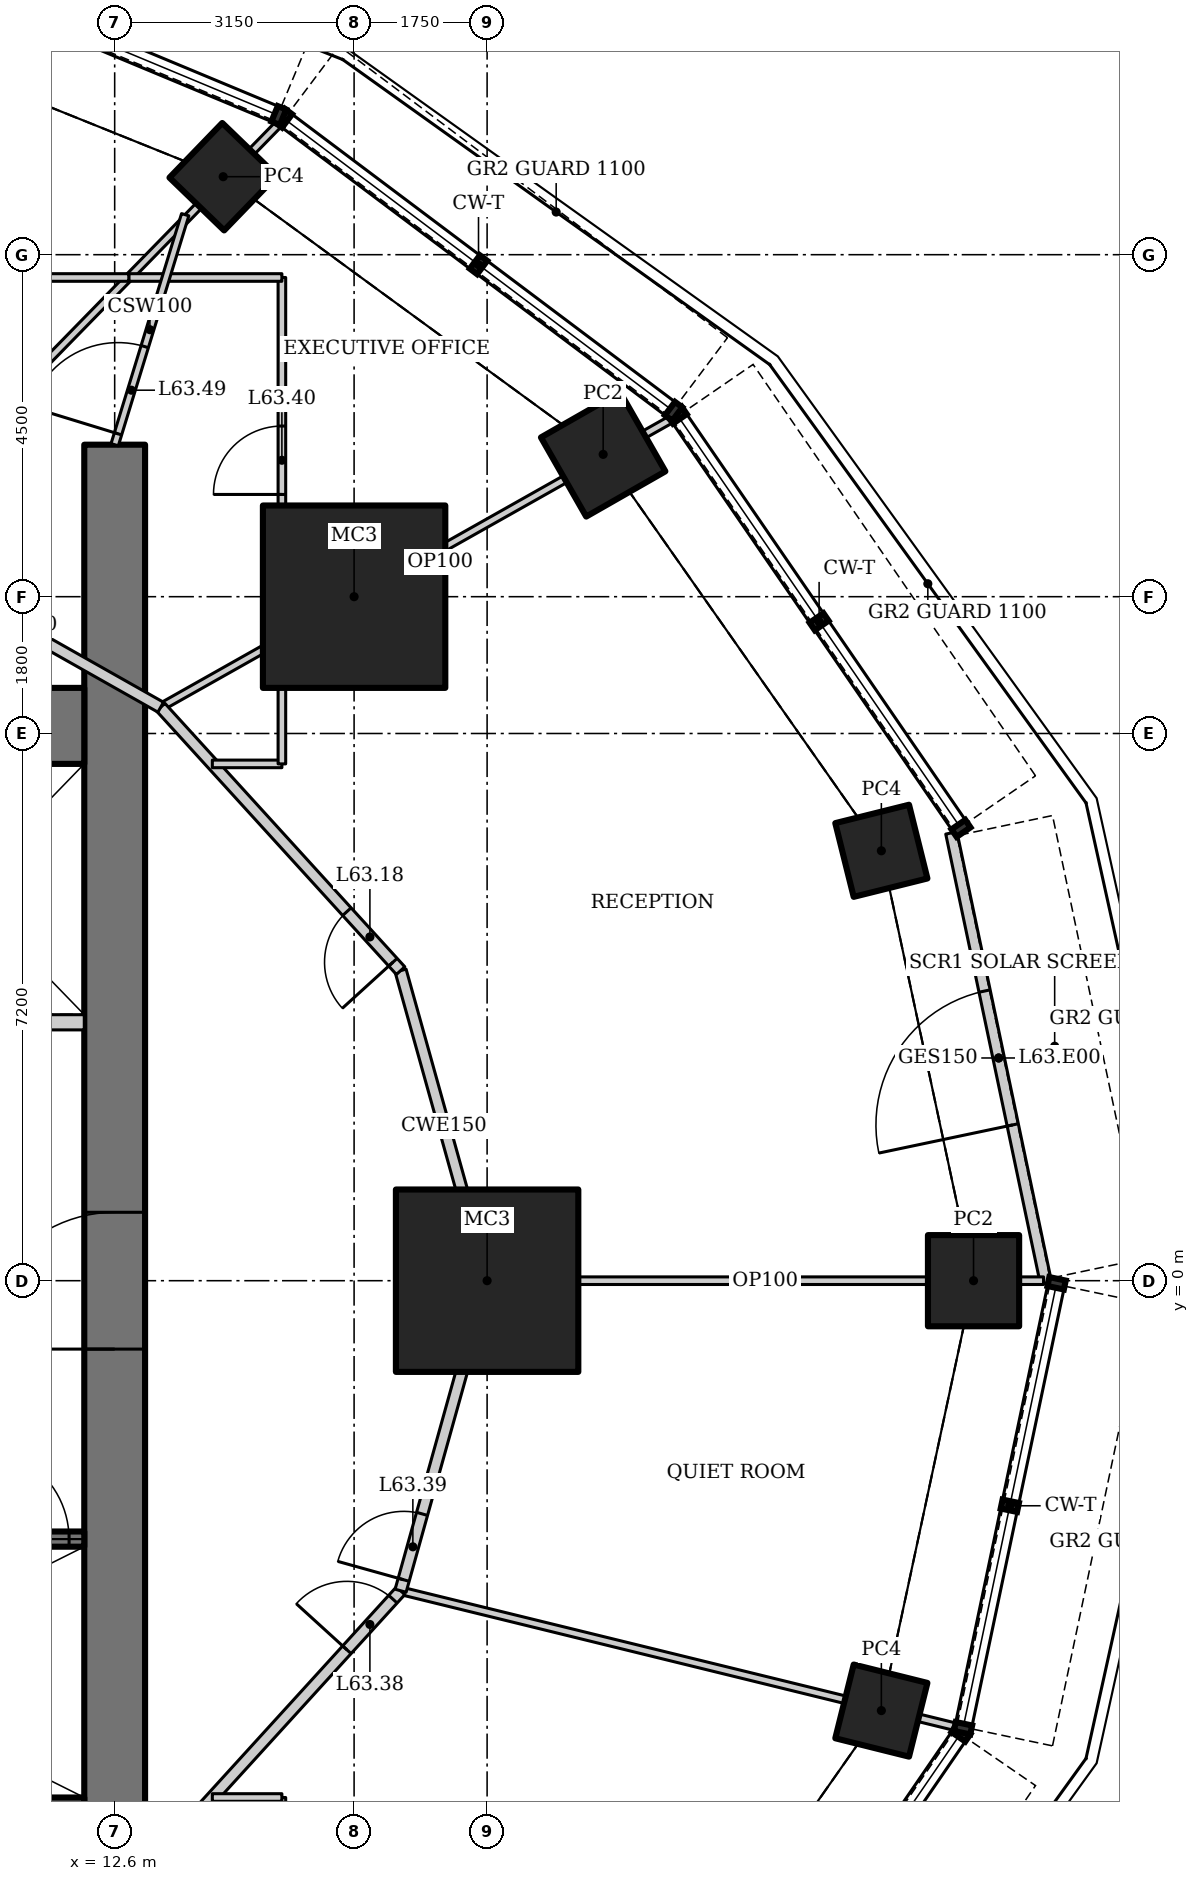
"""IFC4 building model, lengths in metres.
Left out: names, types, materials, properties, quantities, classifications, styles, units other than length and angle.
Written with IfcOpenShell. Run it as: python <this file> out.ifc"""

import sys

from ifc_helpers import new_model, si_unit, direction, frame, frame_2d, origin, origin_2d, place, context, subcontext, project, spatial, rectangle, hollow_rectangle, extrude, element, fill, save


model = new_model("IFC4")
c1 = context("Model", 3, precision=1e-05, world=origin(), true_north=direction((0.0, 1.0)))
c2 = subcontext(c1, "Body", "Model", "MODEL_VIEW")
j1 = project(units=[si_unit("LENGTHUNIT", "METRE"), si_unit("PLANEANGLEUNIT", "RADIAN")], contexts=[c1])
p1 = place(None, origin())
s1 = spatial("IfcSite", under=j1, at=p1, CompositionType="ELEMENT")
p2 = place(p1, origin())
s2 = spatial("IfcBuilding", under=s1, at=p2, CompositionType="ELEMENT")
p3 = place(p2, frame((0.0, 0.0, 270.4)))
s3 = spatial("IfcBuildingStorey", under=s2, at=p3, CompositionType="ELEMENT", Elevation=270.4)
for number, where, z_axis, x_axis in (
    (1, (17.5, 0.0, 0.0), (0.0, 0.0, 1.0), (1.0, 0.0, 0.0)),
    (2, (15.75, 9.0, 0.0), (0.0, 0.0, 1.0), (1.0, 0.0, 0.0)),
):
    element("IfcColumn", number, at=place(p3, frame(where, z_axis=z_axis, x_axis=x_axis)), inside=s3, PredefinedType="COLUMN", context=c2, shape_type="SweptSolid", body=[
        extrude(hollow_rectangle(XDim=2.4, YDim=2.4, WallThickness=0.12, at=origin_2d()), origin(), (0.0, 0.0, 1.0), 4.5),
    ])
p4 = place(p3, frame((23.9, 0.0, 1.059), z_axis=(0.0, 0.0, 1.0), x_axis=(1.0, 0.0, 0.0)))
e3 = element("IfcColumn", 3, at=p4, inside=s3, PredefinedType="COLUMN", context=c2, shape_type="SweptSolid", body=[
    extrude(hollow_rectangle(XDim=1.2, YDim=1.2, WallThickness=0.1, at=origin_2d()), origin(), (0.0, 0.0, 1.0), 3.441),
])
p5 = place(p3, frame((22.687, 5.656, 0.892), z_axis=(0.0, 0.0, 1.0), x_axis=(0.970295726276, 0.2419218956, 0.0)))
e4 = element("IfcColumn", 4, at=p5, inside=s3, PredefinedType="COLUMN", context=c2, shape_type="SweptSolid", body=[
    extrude(hollow_rectangle(XDim=1.0, YDim=1.0, WallThickness=0.08, at=origin_2d()), origin(), (0.0, 0.0, 1.0), 3.608),
])
p6 = place(p3, frame((19.027, 10.873, 1.103), z_axis=(0.0, 0.0, 1.0), x_axis=(0.86824298017, 0.496139221777, 0.0)))
e5 = element("IfcColumn", 5, at=p6, inside=s3, PredefinedType="COLUMN", context=c2, shape_type="SweptSolid", body=[
    extrude(hollow_rectangle(XDim=1.2, YDim=1.2, WallThickness=0.1, at=origin_2d()), origin(), (0.0, 0.0, 1.0), 3.397),
])
p7 = place(p3, frame((14.028, 14.526, 0.947), z_axis=(0.0, 0.0, 1.0), x_axis=(0.694658370459, 0.719339800339, 0.0)))
e6 = element("IfcColumn", 6, at=p7, inside=s3, PredefinedType="COLUMN", context=c2, shape_type="SweptSolid", body=[
    extrude(hollow_rectangle(XDim=1.0, YDim=1.0, WallThickness=0.08, at=origin_2d()), origin(), (0.0, 0.0, 1.0), 3.553),
])
p8 = place(p3, frame((22.687, -5.656, 0.892), z_axis=(0.0, 0.0, 1.0), x_axis=(0.2419218956, 0.970295726276, 0.0)))
e7 = element("IfcColumn", 7, at=p8, inside=s3, PredefinedType="COLUMN", context=c2, shape_type="SweptSolid", body=[
    extrude(hollow_rectangle(XDim=1.0, YDim=1.0, WallThickness=0.08, at=origin_2d()), origin(), (0.0, 0.0, 1.0), 3.608),
])
p9 = place(p3, frame((12.6, -11.0, 0.0), z_axis=(0.0, 0.0, 1.0), x_axis=(0.0, 1.0, 0.0)))
e8 = element("IfcWall", 8, at=p9, inside=s3, PredefinedType="SHEAR", context=c2, shape_type="SweptSolid", body=[
    extrude(rectangle(XDim=22.0, YDim=0.8, at=frame_2d((11.0, 0.0))), origin(), (0.0, 0.0, 1.0), 4.5),
])
p10 = place(p9, frame((10.1, 0.0, 0.0)))
e9 = element("IfcOpeningElement", 9, at=p10, cuts=e8, PredefinedType="OPENING", context=c2, shape_type="SweptSolid", body=[
    extrude(rectangle(XDim=1.8, YDim=2.1, at=frame_2d((0.9, 1.05))), frame((0.0, 0.41, 0.0), z_axis=(0.0, -1.0, 0.0), x_axis=(1.0, 0.0, 0.0)), (0.0, 0.0, 1.0), 0.82),
])
p11 = place(p3, frame((-12.2, -7.3, 0.0), z_axis=(0.0, 0.0, 1.0), x_axis=(1.0, 0.0, 0.0)))
e10 = element("IfcWall", 10, at=p11, inside=s3, PredefinedType="SHEAR", context=c2, shape_type="SweptSolid", body=[
    extrude(rectangle(XDim=24.4, YDim=1.0, at=frame_2d((12.2, 0.0))), origin(), (0.0, 0.0, 1.0), 4.5),
])
p12 = place(p3, frame((12.2, 7.3, 0.0), z_axis=(0.0, 0.0, 1.0), x_axis=(-1.0, 0.0, 0.0)))
e11 = element("IfcWall", 11, at=p12, inside=s3, PredefinedType="SHEAR", context=c2, shape_type="SweptSolid", body=[
    extrude(rectangle(XDim=6.6, YDim=1.0, at=frame_2d((3.3, 0.0))), origin(), (0.0, 0.0, 1.0), 4.5),
])
p13 = place(p3, frame((5.6, -3.4, 0.0), z_axis=(0.0, 0.0, 1.0), x_axis=(1.0, 0.0, 0.0)))
e12 = element("IfcWall", 12, at=p13, inside=s3, PredefinedType="SHEAR", context=c2, shape_type="SweptSolid", body=[
    extrude(rectangle(XDim=6.6, YDim=0.2, at=frame_2d((3.3, 0.0))), origin(), (0.0, 0.0, 1.0), 4.5),
])
p14 = place(p13, frame((5.2, 0.0, 0.0)))
e13 = element("IfcOpeningElement", 13, at=p14, cuts=e12, PredefinedType="OPENING", context=c2, shape_type="SweptSolid", body=[
    extrude(rectangle(XDim=1.2, YDim=2.1, at=frame_2d((0.6, 1.05))), frame((0.0, 0.11, 0.0), z_axis=(0.0, -1.0, 0.0), x_axis=(1.0, 0.0, 0.0)), (0.0, 0.0, 1.0), 0.22),
])
p15 = place(p3, frame((12.2, 3.4, 0.0), z_axis=(0.0, 0.0, 1.0), x_axis=(-1.0, 0.0, 0.0)))
e14 = element("IfcWall", 14, at=p15, inside=s3, PredefinedType="SOLIDWALL", context=c2, shape_type="SweptSolid", body=[
    extrude(rectangle(XDim=6.6, YDim=0.2, at=frame_2d((3.3, 0.0))), origin(), (0.0, 0.0, 1.0), 4.5),
])
p16 = place(p15, frame((4.45, 0.0, 0.0)))
e15 = element("IfcOpeningElement", 15, at=p16, cuts=e14, PredefinedType="OPENING", context=c2, shape_type="SweptSolid", body=[
    extrude(rectangle(XDim=1.1, YDim=2.2, at=frame_2d((0.55, 1.1))), frame((0.0, 0.11, 0.0), z_axis=(0.0, -1.0, 0.0), x_axis=(1.0, 0.0, 0.0)), (0.0, 0.0, 1.0), 0.22),
])
p17 = place(p15, frame((0.9, 0.0, 0.0)))
e16 = element("IfcOpeningElement", 16, at=p17, cuts=e14, PredefinedType="OPENING", context=c2, shape_type="SweptSolid", body=[
    extrude(rectangle(XDim=1.4, YDim=2.2, at=frame_2d((0.7, 1.1))), frame((0.0, 0.11, 0.0), z_axis=(0.0, -1.0, 0.0), x_axis=(1.0, 0.0, 0.0)), (0.0, 0.0, 1.0), 0.22),
])
p18 = place(p3, frame((24.853, -0.031, 0.0), z_axis=(0.0, 0.0, 1.0), x_axis=(-0.20581124117, 0.978591709043, 0.0)))
e17 = element("IfcWall", 17, at=p18, inside=s3, PredefinedType="ELEMENTEDWALL", context=c2, shape_type="SweptSolid", body=[
    extrude(rectangle(XDim=6.052, YDim=0.15, at=frame_2d((3.026, 0.0))), origin(), (0.0, 0.0, 1.0), 4.35),
])
p19 = place(p18, frame((2.126, 0.0, 0.0)))
e18 = element("IfcOpeningElement", 18, at=p19, cuts=e17, PredefinedType="OPENING", context=c2, shape_type="SweptSolid", body=[
    extrude(rectangle(XDim=1.8, YDim=2.4, at=frame_2d((0.9, 1.2))), frame((0.0, 0.085, 0.0), z_axis=(0.0, -1.0, 0.0), x_axis=(1.0, 0.0, 0.0)), (0.0, 0.0, 1.0), 0.17),
])
p20 = place(p3, frame((24.821, 0.0, 0.0), z_axis=(0.0, 0.0, 1.0), x_axis=(-1.0, 0.0, 0.0)))
e19 = element("IfcWall", 19, at=p20, inside=s3, PredefinedType="PARTITIONING", context=c2, shape_type="SweptSolid", body=[
    extrude(rectangle(XDim=7.321, YDim=0.1, at=frame_2d((3.661, 0.0))), origin(), (0.0, 0.0, 1.0), 3.738),
])
p21 = place(p3, frame((19.959, 11.355, 0.0), z_axis=(0.0, 0.0, 1.0), x_axis=(-0.871035125561, -0.491220734537, 0.0)))
e20 = element("IfcWall", 20, at=p21, inside=s3, PredefinedType="PARTITIONING", context=c2, shape_type="SweptSolid", body=[
    extrude(rectangle(XDim=7.753, YDim=0.1, at=frame_2d((3.877, 0.0))), origin(), (0.0, 0.0, 1.0), 3.824),
])
p22 = place(p3, frame((14.789, 15.251, 0.0), z_axis=(0.0, 0.0, 1.0), x_axis=(-0.698752653188, -0.71536335499, 0.0)))
e21 = element("IfcWall", 21, at=p22, inside=s3, PredefinedType="PARTITIONING", context=c2, shape_type="SweptSolid", body=[
    extrude(rectangle(XDim=7.746, YDim=0.1, at=frame_2d((3.873, 0.0))), origin(), (0.0, 0.0, 1.0), 3.723),
])
p23 = place(p3, frame((23.707, -5.881, 0.0), z_axis=(0.0, 0.0, 1.0), x_axis=(-0.971215212425, 0.238203717759, 0.0)))
e22 = element("IfcWall", 22, at=p23, inside=s3, PredefinedType="PARTITIONING", context=c2, shape_type="SweptSolid", body=[
    extrude(rectangle(XDim=7.563, YDim=0.1, at=frame_2d((3.781, 0.0))), origin(), (0.0, 0.0, 1.0), 3.408),
])
p24 = place(p3, frame((17.5, 0.0, 0.0), z_axis=(0.0, 0.0, 1.0), x_axis=(-0.268731808547, 0.963215040931, 0.0)))
e23 = element("IfcWall", 23, at=p24, inside=s3, PredefinedType="PARTITIONING", context=c2, shape_type="SweptSolid", body=[
    extrude(rectangle(XDim=4.235, YDim=0.15, at=frame_2d((2.118, 0.0))), origin(), (0.0, 0.0, 1.0), 4.35),
])
p25 = place(p3, frame((16.362, 4.08, 0.0), z_axis=(0.0, 0.0, 1.0), x_axis=(-0.67323765707, 0.739426167445, 0.0)))
e24 = element("IfcWall", 24, at=p25, inside=s3, PredefinedType="PARTITIONING", context=c2, shape_type="SweptSolid", body=[
    extrude(rectangle(XDim=4.688, YDim=0.15, at=frame_2d((2.344, 0.0))), origin(), (0.0, 0.0, 1.0), 4.35),
])
p26 = place(p25, frame((0.15, 0.0, 0.0)))
e25 = element("IfcOpeningElement", 25, at=p26, cuts=e24, PredefinedType="OPENING", context=c2, shape_type="SweptSolid", body=[
    extrude(rectangle(XDim=0.9, YDim=2.1, at=frame_2d((0.45, 1.05))), frame((0.0, 0.085, 0.0), z_axis=(0.0, -1.0, 0.0), x_axis=(1.0, 0.0, 0.0)), (0.0, 0.0, 1.0), 0.17),
])
p27 = place(p3, frame((13.206, 7.546, 0.0), z_axis=(0.0, 0.0, 1.0), x_axis=(-0.870593853694, 0.492002379984, 0.0)))
e26 = element("IfcWall", 26, at=p27, inside=s3, PredefinedType="PARTITIONING", context=c2, shape_type="SweptSolid", body=[
    extrude(rectangle(XDim=4.398, YDim=0.15, at=frame_2d((2.199, 0.0))), origin(), (0.0, 0.0, 1.0), 4.35),
])
p28 = place(p27, frame((3.348, 0.0, 0.0)))
e27 = element("IfcOpeningElement", 27, at=p28, cuts=e26, PredefinedType="OPENING", context=c2, shape_type="SweptSolid", body=[
    extrude(rectangle(XDim=0.9, YDim=2.1, at=frame_2d((0.45, 1.05))), frame((0.0, 0.085, 0.0), z_axis=(0.0, -1.0, 0.0), x_axis=(1.0, 0.0, 0.0)), (0.0, 0.0, 1.0), 0.17),
])
p29 = place(p3, frame((13.206, -7.546, 0.0), z_axis=(0.0, 0.0, 1.0), x_axis=(0.67323765707, 0.739426167445, 0.0)))
e28 = element("IfcWall", 28, at=p29, inside=s3, PredefinedType="PARTITIONING", context=c2, shape_type="SweptSolid", body=[
    extrude(rectangle(XDim=4.688, YDim=0.15, at=frame_2d((2.344, 0.0))), origin(), (0.0, 0.0, 1.0), 4.35),
])
p30 = place(p29, frame((3.638, 0.0, 0.0)))
e29 = element("IfcOpeningElement", 29, at=p30, cuts=e28, PredefinedType="OPENING", context=c2, shape_type="SweptSolid", body=[
    extrude(rectangle(XDim=0.9, YDim=2.1, at=frame_2d((0.45, 1.05))), frame((0.0, 0.085, 0.0), z_axis=(0.0, -1.0, 0.0), x_axis=(1.0, 0.0, 0.0)), (0.0, 0.0, 1.0), 0.17),
])
p31 = place(p3, frame((16.362, -4.08, 0.0), z_axis=(0.0, 0.0, 1.0), x_axis=(0.268731808547, 0.963215040931, 0.0)))
e30 = element("IfcWall", 30, at=p31, inside=s3, PredefinedType="PARTITIONING", context=c2, shape_type="SweptSolid", body=[
    extrude(rectangle(XDim=4.235, YDim=0.15, at=frame_2d((2.118, 0.0))), origin(), (0.0, 0.0, 1.0), 4.35),
])
p32 = place(p31, frame((0.15, 0.0, 0.0)))
e31 = element("IfcOpeningElement", 31, at=p32, cuts=e30, PredefinedType="OPENING", context=c2, shape_type="SweptSolid", body=[
    extrude(rectangle(XDim=0.9, YDim=2.1, at=frame_2d((0.45, 1.05))), frame((0.0, 0.085, 0.0), z_axis=(0.0, -1.0, 0.0), x_axis=(1.0, 0.0, 0.0)), (0.0, 0.0, 1.0), 0.17),
])
p33 = place(p3, frame((13.885, 6.8, 0.0), z_axis=(0.0, 0.0, 1.0), x_axis=(1.0, 0.0, 0.0)))
e32 = element("IfcWall", 32, at=p33, inside=s3, PredefinedType="PARTITIONING", context=c2, shape_type="SweptSolid", body=[
    extrude(rectangle(XDim=0.915, YDim=0.1, at=frame_2d((0.458, 0.0))), origin(), (0.0, 0.0, 1.0), 4.35),
])
p34 = place(p3, frame((14.8, 6.8, 0.0), z_axis=(0.0, 0.0, 1.0), x_axis=(0.0, 1.0, 0.0)))
e33 = element("IfcWall", 33, at=p34, inside=s3, PredefinedType="PARTITIONING", context=c2, shape_type="SweptSolid", body=[
    extrude(rectangle(XDim=1.645, YDim=0.1, at=frame_2d((0.823, 0.0))), origin(), (0.0, 0.0, 1.0), 4.35),
])
p35 = place(p3, frame((14.8, 8.445, 0.0), z_axis=(0.0, 0.0, 1.0), x_axis=(0.0, 1.0, 0.0)))
e34 = element("IfcWall", 34, at=p35, inside=s3, PredefinedType="PARTITIONING", context=c2, shape_type="SweptSolid", body=[
    extrude(rectangle(XDim=4.755, YDim=0.1, at=frame_2d((2.377, 0.0))), origin(), (0.0, 0.0, 1.0), 4.35),
])
p36 = place(p35, frame((1.9, 0.0, 0.0)))
e35 = element("IfcOpeningElement", 35, at=p36, cuts=e34, PredefinedType="OPENING", context=c2, shape_type="SweptSolid", body=[
    extrude(rectangle(XDim=0.9, YDim=2.1, at=frame_2d((0.45, 1.05))), frame((0.0, 0.06, 0.0), z_axis=(0.0, -1.0, 0.0), x_axis=(1.0, 0.0, 0.0)), (0.0, 0.0, 1.0), 0.12),
])
p37 = place(p3, frame((14.8, 13.2, 0.0), z_axis=(0.0, 0.0, 1.0), x_axis=(-1.0, 0.0, 0.0)))
e36 = element("IfcWall", 36, at=p37, inside=s3, PredefinedType="PARTITIONING", context=c2, shape_type="SweptSolid", body=[
    extrude(rectangle(XDim=2.014, YDim=0.1, at=frame_2d((1.007, 0.0))), origin(), (0.0, 0.0, 1.0), 4.35),
])
p38 = place(p3, frame((12.786, 13.2, 0.0), z_axis=(0.0, 0.0, 1.0), x_axis=(-1.0, 0.0, 0.0)))
e37 = element("IfcWall", 37, at=p38, inside=s3, PredefinedType="PARTITIONING", context=c2, shape_type="SweptSolid", body=[
    extrude(rectangle(XDim=2.386, YDim=0.1, at=frame_2d((1.193, 0.0))), origin(), (0.0, 0.0, 1.0), 4.35),
])
p39 = place(p3, frame((14.8, -8.445, 0.0), z_axis=(0.0, 0.0, 1.0), x_axis=(0.0, 1.0, 0.0)))
e38 = element("IfcWall", 38, at=p39, inside=s3, PredefinedType="PARTITIONING", context=c2, shape_type="SweptSolid", body=[
    extrude(rectangle(XDim=1.645, YDim=0.1, at=frame_2d((0.823, 0.0))), origin(), (0.0, 0.0, 1.0), 4.35),
])
p40 = place(p3, frame((14.8, -6.8, 0.0), z_axis=(0.0, 0.0, 1.0), x_axis=(-1.0, 0.0, 0.0)))
e39 = element("IfcWall", 39, at=p40, inside=s3, PredefinedType="PARTITIONING", context=c2, shape_type="SweptSolid", body=[
    extrude(rectangle(XDim=0.915, YDim=0.1, at=frame_2d((0.458, 0.0))), origin(), (0.0, 0.0, 1.0), 4.35),
])
p41 = place(p3, frame((12.6, 11.0, 0.0), z_axis=(0.0, 0.0, 1.0), x_axis=(0.293039542174, 0.95610032252, 0.0)))
e40 = element("IfcWall", 40, at=p41, inside=s3, PredefinedType="PARTITIONING", context=c2, shape_type="SweptSolid", body=[
    extrude(rectangle(XDim=3.165, YDim=0.1, at=frame_2d((1.583, 0.0))), origin(), (0.0, 0.0, 1.0), 4.35),
])
p42 = place(p41, frame((0.15, 0.0, 0.0)))
e41 = element("IfcOpeningElement", 41, at=p42, cuts=e40, PredefinedType="OPENING", context=c2, shape_type="SweptSolid", body=[
    extrude(rectangle(XDim=1.2, YDim=2.1, at=frame_2d((0.6, 1.05))), frame((0.0, 0.06, 0.0), z_axis=(0.0, -1.0, 0.0), x_axis=(1.0, 0.0, 0.0)), (0.0, 0.0, 1.0), 0.12),
])
p43 = place(p19, origin())
e42 = element("IfcDoor", 42, at=p43, inside=s3, OperationType="DOUBLE_DOOR_DOUBLE_SWING", PredefinedType="DOOR", context=c2, shape_type="SweptSolid", body=[
    extrude(rectangle(XDim=1.8, YDim=2.4, at=frame_2d((0.9, 1.2))), frame((0.0, 0.025, 0.0), z_axis=(0.0, -1.0, 0.0), x_axis=(1.0, 0.0, 0.0)), (0.0, 0.0, 1.0), 0.05),
])
fill(e18, e42)
p44 = place(p14, origin())
e43 = element("IfcDoor", 43, at=p44, inside=s3, OperationType="SINGLE_SWING_RIGHT", PredefinedType="DOOR", context=c2, shape_type="SweptSolid", body=[
    extrude(rectangle(XDim=1.2, YDim=2.1, at=frame_2d((0.6, 1.05))), frame((0.0, 0.025, 0.0), z_axis=(0.0, -1.0, 0.0), x_axis=(1.0, 0.0, 0.0)), (0.0, 0.0, 1.0), 0.05),
])
fill(e13, e43)
p45 = place(p10, origin())
e44 = element("IfcDoor", 44, at=p45, inside=s3, OperationType="DOUBLE_DOOR_DOUBLE_SWING", PredefinedType="DOOR", context=c2, shape_type="SweptSolid", body=[
    extrude(rectangle(XDim=1.8, YDim=2.1, at=frame_2d((0.9, 1.05))), frame((0.0, 0.025, 0.0), z_axis=(0.0, -1.0, 0.0), x_axis=(1.0, 0.0, 0.0)), (0.0, 0.0, 1.0), 0.05),
])
fill(e9, e44)
p46 = place(p26, origin())
e45 = element("IfcDoor", 45, at=p46, inside=s3, OperationType="SINGLE_SWING_LEFT", PredefinedType="DOOR", context=c2, shape_type="SweptSolid", body=[
    extrude(rectangle(XDim=0.9, YDim=2.1, at=frame_2d((0.45, 1.05))), frame((0.0, 0.025, 0.0), z_axis=(0.0, -1.0, 0.0), x_axis=(1.0, 0.0, 0.0)), (0.0, 0.0, 1.0), 0.05),
])
fill(e25, e45)
p47 = place(p30, origin())
e46 = element("IfcDoor", 46, at=p47, inside=s3, OperationType="SINGLE_SWING_LEFT", PredefinedType="DOOR", context=c2, shape_type="SweptSolid", body=[
    extrude(rectangle(XDim=0.9, YDim=2.1, at=frame_2d((0.45, 1.05))), frame((0.0, 0.025, 0.0), z_axis=(0.0, -1.0, 0.0), x_axis=(1.0, 0.0, 0.0)), (0.0, 0.0, 1.0), 0.05),
])
fill(e29, e46)
p48 = place(p32, origin())
e47 = element("IfcDoor", 47, at=p48, inside=s3, OperationType="SINGLE_SWING_LEFT", PredefinedType="DOOR", context=c2, shape_type="SweptSolid", body=[
    extrude(rectangle(XDim=0.9, YDim=2.1, at=frame_2d((0.45, 1.05))), frame((0.0, 0.025, 0.0), z_axis=(0.0, -1.0, 0.0), x_axis=(1.0, 0.0, 0.0)), (0.0, 0.0, 1.0), 0.05),
])
fill(e31, e47)
p49 = place(p36, origin())
e48 = element("IfcDoor", 48, at=p49, inside=s3, OperationType="SINGLE_SWING_LEFT", PredefinedType="DOOR", context=c2, shape_type="SweptSolid", body=[
    extrude(rectangle(XDim=0.9, YDim=2.1, at=frame_2d((0.45, 1.05))), frame((0.0, 0.025, 0.0), z_axis=(0.0, -1.0, 0.0), x_axis=(1.0, 0.0, 0.0)), (0.0, 0.0, 1.0), 0.05),
])
fill(e35, e48)
p50 = place(p42, origin())
e49 = element("IfcDoor", 49, at=p50, inside=s3, OperationType="DOUBLE_DOOR_DOUBLE_SWING", PredefinedType="DOOR", context=c2, shape_type="SweptSolid", body=[
    extrude(rectangle(XDim=1.2, YDim=2.1, at=frame_2d((0.6, 1.05))), frame((0.0, 0.025, 0.0), z_axis=(0.0, -1.0, 0.0), x_axis=(1.0, 0.0, 0.0)), (0.0, 0.0, 1.0), 0.05),
])
fill(e41, e49)
save(model, sys.argv[1])
